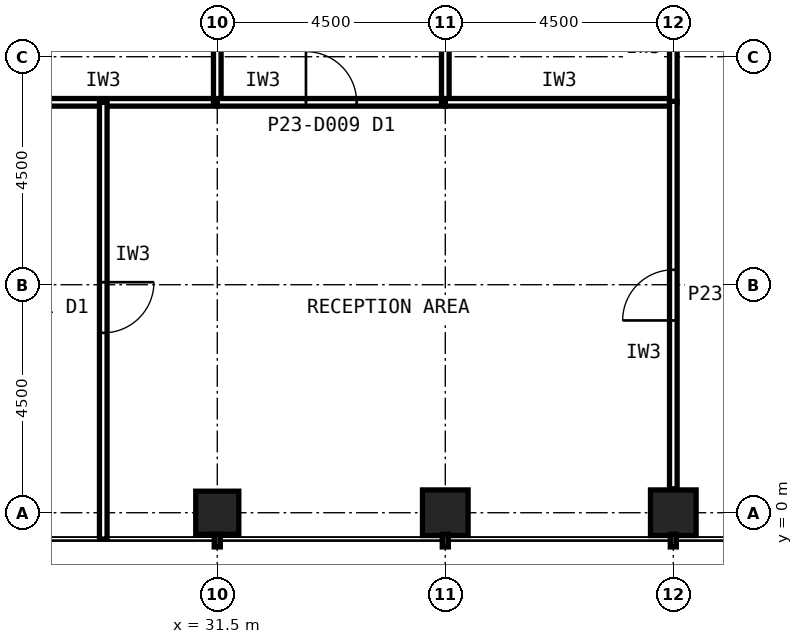
"""IFC4 building model, lengths in metres.
Left out: names, types, materials, properties, quantities, classifications, styles, units other than length and angle.
Written with IfcOpenShell. Run it as: python <this file> out.ifc"""

import sys

from ifc_helpers import new_model, si_unit, direction, frame, frame_2d, origin, origin_2d, place, context, subcontext, project, spatial, rectangle, hollow_rectangle, extrude, element, fill, save


model = new_model("IFC4")
c1 = context("Model", 3, precision=1e-05, world=origin(), true_north=direction((0.0, 1.0)))
c2 = subcontext(c1, "Body", "Model", "MODEL_VIEW")
j1 = project(units=[si_unit("LENGTHUNIT", "METRE"), si_unit("PLANEANGLEUNIT", "RADIAN")], contexts=[c1])
p1 = place(None, origin())
s1 = spatial("IfcSite", under=j1, at=p1, CompositionType="ELEMENT")
p2 = place(p1, origin())
s2 = spatial("IfcBuilding", under=s1, at=p2, CompositionType="ELEMENT")
p3 = place(p2, frame((0.0, 0.0, 96.2)))
s3 = spatial("IfcBuildingStorey", under=s2, at=p3, CompositionType="ELEMENT", Elevation=96.2)
p4 = place(p3, frame((31.5, 0.0, 0.0), z_axis=(0.0, 0.0, 1.0), x_axis=(1.0, 0.0, 0.0)))
e1 = element("IfcColumn", 1, at=p4, inside=s3, PredefinedType="COLUMN", context=c2, shape_type="SweptSolid", body=[
    extrude(hollow_rectangle(XDim=0.8, YDim=0.8, WallThickness=0.045, at=origin_2d()), origin(), (0.0, 0.0, 1.0), 4.2),
])
p5 = place(p3, frame((36.0, 0.0, 0.0), z_axis=(0.0, 0.0, 1.0), x_axis=(1.0, 0.0, 0.0)))
e2 = element("IfcColumn", 2, at=p5, inside=s3, PredefinedType="COLUMN", context=c2, shape_type="SweptSolid", body=[
    extrude(hollow_rectangle(XDim=0.9, YDim=0.9, WallThickness=0.063, at=origin_2d()), origin(), (0.0, 0.0, 1.0), 4.2),
])
p6 = place(p3, frame((40.5, 0.0, 0.0), z_axis=(0.0, 0.0, 1.0), x_axis=(1.0, 0.0, 0.0)))
e3 = element("IfcColumn", 3, at=p6, inside=s3, PredefinedType="COLUMN", context=c2, shape_type="SweptSolid", body=[
    extrude(hollow_rectangle(XDim=0.85, YDim=0.85, WallThickness=0.05, at=origin_2d()), origin(), (0.0, 0.0, 1.0), 4.2),
])
p7 = place(p3, frame((27.0, 8.1, 0.0), z_axis=(0.0, 0.0, 1.0), x_axis=(1.0, 0.0, 0.0)))
e4 = element("IfcWall", 4, at=p7, inside=s3, PredefinedType="PARTITIONING", context=c2, shape_type="SweptSolid", body=[
    extrude(rectangle(XDim=4.5, YDim=0.15, at=frame_2d((2.25, 0.0))), origin(), (0.0, 0.0, 1.0), 4.04),
])
p8 = place(p3, frame((31.5, 8.1, 0.0), z_axis=(0.0, 0.0, 1.0), x_axis=(0.0, 1.0, 0.0)))
e5 = element("IfcWall", 5, at=p8, inside=s3, PredefinedType="PARTITIONING", context=c2, shape_type="SweptSolid", body=[
    extrude(rectangle(XDim=5.4, YDim=0.15, at=frame_2d((2.7, 0.0))), origin(), (0.0, 0.0, 1.0), 3.189),
])
p9 = place(p3, frame((31.5, 8.1, 0.0), z_axis=(0.0, 0.0, 1.0), x_axis=(1.0, 0.0, 0.0)))
e6 = element("IfcWall", 6, at=p9, inside=s3, PredefinedType="PARTITIONING", context=c2, shape_type="SweptSolid", body=[
    extrude(rectangle(XDim=4.5, YDim=0.15, at=frame_2d((2.25, 0.0))), origin(), (0.0, 0.0, 1.0), 4.04),
])
p10 = place(p9, frame((1.75, 0.0, 0.0)))
e7 = element("IfcOpeningElement", 7, at=p10, cuts=e6, PredefinedType="OPENING", context=c2, shape_type="SweptSolid", body=[
    extrude(rectangle(XDim=1.0, YDim=2.1, at=frame_2d((0.5, 1.05))), frame((0.0, 0.085, 0.0), z_axis=(0.0, -1.0, 0.0), x_axis=(1.0, 0.0, 0.0)), (0.0, 0.0, 1.0), 0.17),
])
p11 = place(p3, frame((36.0, 8.1, 0.0), z_axis=(0.0, 0.0, 1.0), x_axis=(0.0, 1.0, 0.0)))
e8 = element("IfcWall", 8, at=p11, inside=s3, PredefinedType="PARTITIONING", context=c2, shape_type="SweptSolid", body=[
    extrude(rectangle(XDim=5.4, YDim=0.15, at=frame_2d((2.7, 0.0))), origin(), (0.0, 0.0, 1.0), 3.189),
])
p12 = place(p3, frame((36.0, 8.1, 0.0), z_axis=(0.0, 0.0, 1.0), x_axis=(1.0, 0.0, 0.0)))
e9 = element("IfcWall", 9, at=p12, inside=s3, PredefinedType="PARTITIONING", context=c2, shape_type="SweptSolid", body=[
    extrude(rectangle(XDim=4.5, YDim=0.15, at=frame_2d((2.25, 0.0))), origin(), (0.0, 0.0, 1.0), 4.04),
])
p13 = place(p3, frame((40.5, 8.1, 0.0), z_axis=(0.0, 0.0, 1.0), x_axis=(0.0, 1.0, 0.0)))
e10 = element("IfcWall", 10, at=p13, inside=s3, PredefinedType="PARTITIONING", context=c2, shape_type="SweptSolid", body=[
    extrude(rectangle(XDim=5.4, YDim=0.15, at=frame_2d((2.7, 0.0))), origin(), (0.0, 0.0, 1.0), 3.189),
])
p14 = place(p13, frame((2.2, 0.0, 0.0)))
e11 = element("IfcOpeningElement", 11, at=p14, cuts=e10, PredefinedType="OPENING", context=c2, shape_type="SweptSolid", body=[
    extrude(rectangle(XDim=1.0, YDim=2.1, at=frame_2d((0.5, 1.05))), frame((0.0, 0.085, 0.0), z_axis=(0.0, -1.0, 0.0), x_axis=(1.0, 0.0, 0.0)), (0.0, 0.0, 1.0), 0.17),
])
p15 = place(p3, frame((29.25, 8.1, 0.0), z_axis=(0.0, 0.0, 1.0), x_axis=(0.0, -1.0, 0.0)))
e12 = element("IfcWall", 12, at=p15, inside=s3, PredefinedType="PARTITIONING", context=c2, shape_type="SweptSolid", body=[
    extrude(rectangle(XDim=8.62, YDim=0.15, at=frame_2d((4.31, 0.0))), origin(), (0.0, 0.0, 1.0), 4.04),
])
p16 = place(p15, frame((3.55, 0.0, 0.0)))
e13 = element("IfcOpeningElement", 13, at=p16, cuts=e12, PredefinedType="OPENING", context=c2, shape_type="SweptSolid", body=[
    extrude(rectangle(XDim=1.0, YDim=2.1, at=frame_2d((0.5, 1.05))), frame((0.0, 0.085, 0.0), z_axis=(0.0, -1.0, 0.0), x_axis=(1.0, 0.0, 0.0)), (0.0, 0.0, 1.0), 0.17),
])
p17 = place(p3, frame((40.5, 0.445, 0.0), z_axis=(0.0, 0.0, 1.0), x_axis=(0.0, 1.0, 0.0)))
e14 = element("IfcWall", 14, at=p17, inside=s3, PredefinedType="PARTITIONING", context=c2, shape_type="SweptSolid", body=[
    extrude(rectangle(XDim=7.675, YDim=0.15, at=frame_2d((3.837, 0.0))), origin(), (0.0, 0.0, 1.0), 3.189),
])
p18 = place(p17, frame((3.337, 0.0, 0.0)))
e15 = element("IfcOpeningElement", 15, at=p18, cuts=e14, PredefinedType="OPENING", context=c2, shape_type="SweptSolid", body=[
    extrude(rectangle(XDim=1.0, YDim=2.1, at=frame_2d((0.5, 1.05))), frame((0.0, 0.085, 0.0), z_axis=(0.0, -1.0, 0.0), x_axis=(1.0, 0.0, 0.0)), (0.0, 0.0, 1.0), 0.17),
])
p19 = place(p10, origin())
e16 = element("IfcDoor", 16, at=p19, inside=s3, OperationType="SINGLE_SWING_LEFT", PredefinedType="DOOR", context=c2, shape_type="SweptSolid", body=[
    extrude(rectangle(XDim=1.0, YDim=2.1, at=frame_2d((0.5, 1.05))), frame((0.0, 0.025, 0.0), z_axis=(0.0, -1.0, 0.0), x_axis=(1.0, 0.0, 0.0)), (0.0, 0.0, 1.0), 0.05),
])
fill(e7, e16)
p20 = place(p16, origin())
e17 = element("IfcDoor", 17, at=p20, inside=s3, OperationType="SINGLE_SWING_LEFT", PredefinedType="DOOR", context=c2, shape_type="SweptSolid", body=[
    extrude(rectangle(XDim=1.0, YDim=2.1, at=frame_2d((0.5, 1.05))), frame((0.0, 0.025, 0.0), z_axis=(0.0, -1.0, 0.0), x_axis=(1.0, 0.0, 0.0)), (0.0, 0.0, 1.0), 0.05),
])
fill(e13, e17)
p21 = place(p18, origin())
e18 = element("IfcDoor", 18, at=p21, inside=s3, OperationType="SINGLE_SWING_LEFT", PredefinedType="DOOR", context=c2, shape_type="SweptSolid", body=[
    extrude(rectangle(XDim=1.0, YDim=2.1, at=frame_2d((0.5, 1.05))), frame((0.0, 0.025, 0.0), z_axis=(0.0, -1.0, 0.0), x_axis=(1.0, 0.0, 0.0)), (0.0, 0.0, 1.0), 0.05),
])
fill(e15, e18)
save(model, sys.argv[1])
